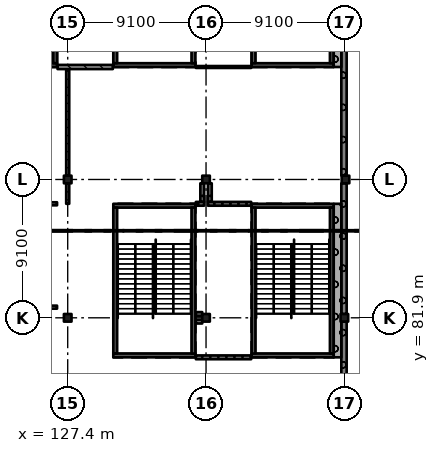
"""IFC4 building model, lengths in metres.
Left out: names, types, materials, properties, quantities, classifications, styles, units other than length and angle.
Written with IfcOpenShell. Run it as: python <this file> out.ifc"""

import sys

from ifc_helpers import new_model, si_unit, direction, frame, frame_2d, origin, origin_2d, place, context, subcontext, project, spatial, rectangle, extrude, element, fill, save


model = new_model("IFC4")
c1 = context("Model", 3, precision=1e-05, world=origin(), true_north=direction((0.0, 1.0)))
c2 = subcontext(c1, "Body", "Model", "MODEL_VIEW")
j1 = project(units=[si_unit("LENGTHUNIT", "METRE"), si_unit("PLANEANGLEUNIT", "RADIAN")], contexts=[c1])
p1 = place(None, origin())
s1 = spatial("IfcSite", under=j1, at=p1, CompositionType="ELEMENT")
p2 = place(p1, origin())
s2 = spatial("IfcBuilding", under=s1, at=p2, CompositionType="ELEMENT")
p3 = place(p2, frame((0.0, 0.0, 24.57)))
s3 = spatial("IfcBuildingStorey", under=s2, at=p3, CompositionType="ELEMENT", Elevation=24.57)
for number, where, z_axis, x_axis in (
    (1, (127.4, 81.9, 0.0), (0.0, 0.0, 1.0), (1.0, 0.0, 0.0)),
    (2, (127.4, 91.0, 0.0), (0.0, 0.0, 1.0), (1.0, 0.0, 0.0)),
    (3, (136.5, 81.9, 0.0), (0.0, 0.0, 1.0), (1.0, 0.0, 0.0)),
    (4, (136.5, 91.0, 0.0), (0.0, 0.0, 1.0), (1.0, 0.0, 0.0)),
    (5, (145.6, 81.9, 0.0), (0.0, 0.0, 1.0), (1.0, 0.0, 0.0)),
    (6, (145.675, 91.0, 0.0), (0.0, 0.0, 1.0), (1.0, 0.0, 0.0)),
):
    element("IfcColumn", number, at=place(p3, frame(where, z_axis=z_axis, x_axis=x_axis)), inside=s3, PredefinedType="COLUMN", context=c2, shape_type="SweptSolid", body=[
        extrude(rectangle(XDim=0.5, YDim=0.5, at=origin_2d()), origin(), (0.0, 0.0, 1.0), 4.55),
    ])
p4 = place(p3, frame((144.9, 98.525, 0.0), z_axis=(0.0, 0.0, 1.0), x_axis=(-1.0, 0.0, 0.0)))
e7 = element("IfcWall", 7, at=p4, inside=s3, PredefinedType="SHEAR", context=c2, shape_type="SweptSolid", body=[
    extrude(rectangle(XDim=5.4, YDim=0.25, at=frame_2d((2.7, 0.0))), origin(), (0.0, 0.0, 1.0), 4.55),
])
p5 = place(p4, frame((1.5, 0.0, 0.0)))
e8 = element("IfcOpeningElement", 8, at=p5, cuts=e7, PredefinedType="OPENING", context=c2, shape_type="SweptSolid", body=[
    extrude(rectangle(XDim=2.4, YDim=2.1, at=frame_2d((1.2, 1.05))), frame((0.0, 0.135, 0.0), z_axis=(0.0, -1.0, 0.0), x_axis=(1.0, 0.0, 0.0)), (0.0, 0.0, 1.0), 0.27),
])
for number, where, z_axis, x_axis in (
    (9, (139.625, 108.25, 0.0), (0.0, 0.0, 1.0), (0.0, -1.0, 0.0)),
    (10, (144.775, 108.25, 0.0), (0.0, 0.0, 1.0), (0.0, -1.0, 0.0)),
):
    element("IfcWall", number, at=place(p3, frame(where, z_axis=z_axis, x_axis=x_axis)), inside=s3, PredefinedType="SHEAR", context=c2, shape_type="SweptSolid", body=[
        extrude(rectangle(XDim=9.6, YDim=0.25, at=frame_2d((4.8, 0.0))), origin(), (0.0, 0.0, 1.0), 4.55),
    ])
p6 = place(p3, frame((135.8, 98.525, 0.0), z_axis=(0.0, 0.0, 1.0), x_axis=(-1.0, 0.0, 0.0)))
e11 = element("IfcWall", 11, at=p6, inside=s3, PredefinedType="SHEAR", context=c2, shape_type="SweptSolid", body=[
    extrude(rectangle(XDim=5.4, YDim=0.25, at=frame_2d((2.7, 0.0))), origin(), (0.0, 0.0, 1.0), 4.55),
])
p7 = place(p6, frame((1.5, 0.0, 0.0)))
e12 = element("IfcOpeningElement", 12, at=p7, cuts=e11, PredefinedType="OPENING", context=c2, shape_type="SweptSolid", body=[
    extrude(rectangle(XDim=2.4, YDim=2.1, at=frame_2d((1.2, 1.05))), frame((0.0, 0.135, 0.0), z_axis=(0.0, -1.0, 0.0), x_axis=(1.0, 0.0, 0.0)), (0.0, 0.0, 1.0), 0.27),
])
for number, where, z_axis, x_axis in (
    (13, (130.525, 108.25, 0.0), (0.0, 0.0, 1.0), (0.0, -1.0, 0.0)),
    (14, (135.675, 108.25, 0.0), (0.0, 0.0, 1.0), (0.0, -1.0, 0.0)),
):
    element("IfcWall", number, at=place(p3, frame(where, z_axis=z_axis, x_axis=x_axis)), inside=s3, PredefinedType="SHEAR", context=c2, shape_type="SweptSolid", body=[
        extrude(rectangle(XDim=9.6, YDim=0.25, at=frame_2d((4.8, 0.0))), origin(), (0.0, 0.0, 1.0), 4.55),
    ])
p8 = place(p3, frame((126.7, 98.525, 0.0), z_axis=(0.0, 0.0, 1.0), x_axis=(-1.0, 0.0, 0.0)))
e15 = element("IfcWall", 15, at=p8, inside=s3, PredefinedType="SHEAR", context=c2, shape_type="SweptSolid", body=[
    extrude(rectangle(XDim=5.4, YDim=0.25, at=frame_2d((2.7, 0.0))), origin(), (0.0, 0.0, 1.0), 4.55),
])
p9 = place(p8, frame((1.5, 0.0, 0.0)))
e16 = element("IfcOpeningElement", 16, at=p9, cuts=e15, PredefinedType="OPENING", context=c2, shape_type="SweptSolid", body=[
    extrude(rectangle(XDim=2.4, YDim=2.1, at=frame_2d((1.2, 1.05))), frame((0.0, 0.135, 0.0), z_axis=(0.0, -1.0, 0.0), x_axis=(1.0, 0.0, 0.0)), (0.0, 0.0, 1.0), 0.27),
])
p10 = place(p3, frame((126.575, 108.25, 0.0), z_axis=(0.0, 0.0, 1.0), x_axis=(0.0, -1.0, 0.0)))
e17 = element("IfcWall", 17, at=p10, inside=s3, PredefinedType="SHEAR", context=c2, shape_type="SweptSolid", body=[
    extrude(rectangle(XDim=9.6, YDim=0.25, at=frame_2d((4.8, 0.0))), origin(), (0.0, 0.0, 1.0), 4.55),
])
p11 = place(p3, frame((144.9, 79.425, 0.0), z_axis=(0.0, 0.0, 1.0), x_axis=(-1.0, 0.0, 0.0)))
e18 = element("IfcWall", 18, at=p11, inside=s3, PredefinedType="SHEAR", context=c2, shape_type="SweptSolid", body=[
    extrude(rectangle(XDim=5.4, YDim=0.25, at=frame_2d((2.7, 0.0))), origin(), (0.0, 0.0, 1.0), 4.55),
])
p12 = place(p3, frame((144.9, 89.275, 0.0), z_axis=(0.0, 0.0, 1.0), x_axis=(-1.0, 0.0, 0.0)))
e19 = element("IfcWall", 19, at=p12, inside=s3, PredefinedType="SHEAR", context=c2, shape_type="SweptSolid", body=[
    extrude(rectangle(XDim=5.4, YDim=0.25, at=frame_2d((2.7, 0.0))), origin(), (0.0, 0.0, 1.0), 4.55),
])
p13 = place(p12, frame((1.5, 0.0, 0.0)))
e20 = element("IfcOpeningElement", 20, at=p13, cuts=e19, PredefinedType="OPENING", context=c2, shape_type="SweptSolid", body=[
    extrude(rectangle(XDim=2.4, YDim=2.1, at=frame_2d((1.2, 1.05))), frame((0.0, 0.135, 0.0), z_axis=(0.0, -1.0, 0.0), x_axis=(1.0, 0.0, 0.0)), (0.0, 0.0, 1.0), 0.27),
])
for number, where, z_axis, x_axis in (
    (21, (139.625, 89.15, 0.0), (0.0, 0.0, 1.0), (0.0, -1.0, 0.0)),
    (22, (144.775, 89.15, 0.0), (0.0, 0.0, 1.0), (0.0, -1.0, 0.0)),
):
    element("IfcWall", number, at=place(p3, frame(where, z_axis=z_axis, x_axis=x_axis)), inside=s3, PredefinedType="SHEAR", context=c2, shape_type="SweptSolid", body=[
        extrude(rectangle(XDim=9.6, YDim=0.25, at=frame_2d((4.8, 0.0))), origin(), (0.0, 0.0, 1.0), 4.55),
    ])
p14 = place(p3, frame((135.8, 79.425, 0.0), z_axis=(0.0, 0.0, 1.0), x_axis=(-1.0, 0.0, 0.0)))
e23 = element("IfcWall", 23, at=p14, inside=s3, PredefinedType="SHEAR", context=c2, shape_type="SweptSolid", body=[
    extrude(rectangle(XDim=5.4, YDim=0.25, at=frame_2d((2.7, 0.0))), origin(), (0.0, 0.0, 1.0), 4.55),
])
p15 = place(p3, frame((135.8, 89.275, 0.0), z_axis=(0.0, 0.0, 1.0), x_axis=(-1.0, 0.0, 0.0)))
e24 = element("IfcWall", 24, at=p15, inside=s3, PredefinedType="SHEAR", context=c2, shape_type="SweptSolid", body=[
    extrude(rectangle(XDim=5.4, YDim=0.25, at=frame_2d((2.7, 0.0))), origin(), (0.0, 0.0, 1.0), 4.55),
])
p16 = place(p15, frame((1.5, 0.0, 0.0)))
e25 = element("IfcOpeningElement", 25, at=p16, cuts=e24, PredefinedType="OPENING", context=c2, shape_type="SweptSolid", body=[
    extrude(rectangle(XDim=2.4, YDim=2.1, at=frame_2d((1.2, 1.05))), frame((0.0, 0.135, 0.0), z_axis=(0.0, -1.0, 0.0), x_axis=(1.0, 0.0, 0.0)), (0.0, 0.0, 1.0), 0.27),
])
for number, where, z_axis, x_axis in (
    (26, (130.525, 89.15, 0.0), (0.0, 0.0, 1.0), (0.0, -1.0, 0.0)),
    (27, (135.675, 89.15, 0.0), (0.0, 0.0, 1.0), (0.0, -1.0, 0.0)),
):
    element("IfcWall", number, at=place(p3, frame(where, z_axis=z_axis, x_axis=x_axis)), inside=s3, PredefinedType="SHEAR", context=c2, shape_type="SweptSolid", body=[
        extrude(rectangle(XDim=9.6, YDim=0.25, at=frame_2d((4.8, 0.0))), origin(), (0.0, 0.0, 1.0), 4.55),
    ])
p17 = place(p3, frame((145.575, 73.05, 0.0), z_axis=(0.0, 0.0, 1.0), x_axis=(0.0, 1.0, 0.0)))
e28 = element("IfcWall", 28, at=p17, inside=s3, PredefinedType="SOLIDWALL", context=c2, shape_type="SweptSolid", body=[
    extrude(rectangle(XDim=8.6, YDim=0.35, at=frame_2d((4.3, 0.0))), origin(), (0.0, 0.0, 1.0), 3.6),
])
for number, where, z_axis, x_axis in (
    (29, (145.575, 82.15, 0.0), (0.0, 0.0, 1.0), (0.0, 1.0, 0.0)),
    (30, (145.575, 91.25, 0.0), (0.0, 0.0, 1.0), (0.0, 1.0, 0.0)),
):
    element("IfcWall", number, at=place(p3, frame(where, z_axis=z_axis, x_axis=x_axis)), inside=s3, PredefinedType="SOLIDWALL", context=c2, shape_type="SweptSolid", body=[
        extrude(rectangle(XDim=8.6, YDim=0.35, at=frame_2d((4.3, 0.0))), origin(), (0.0, 0.0, 1.0), 3.6),
    ])
p18 = place(p3, frame((145.15, 98.4, 0.0), z_axis=(0.0, 0.0, 1.0), x_axis=(0.0, 1.0, 0.0)))
e31 = element("IfcWall", 31, at=p18, inside=s3, PredefinedType="SOLIDWALL", context=c2, shape_type="SweptSolid", body=[
    extrude(rectangle(XDim=10.1, YDim=0.5, at=frame_2d((5.05, 0.0))), origin(), (0.0, 0.0, 1.0), 4.55),
])
p19 = place(p3, frame((145.15, 79.3, 0.0), z_axis=(0.0, 0.0, 1.0), x_axis=(0.0, 1.0, 0.0)))
e32 = element("IfcWall", 32, at=p19, inside=s3, PredefinedType="SOLIDWALL", context=c2, shape_type="SweptSolid", body=[
    extrude(rectangle(XDim=10.1, YDim=0.5, at=frame_2d((5.05, 0.0))), origin(), (0.0, 0.0, 1.0), 4.55),
])
p20 = place(p3, frame((126.7, 82.6, 0.0), z_axis=(0.0, 0.0, 1.0), x_axis=(-1.0, 0.0, 0.0)))
e33 = element("IfcWall", 33, at=p20, inside=s3, PredefinedType="PARTITIONING", context=c2, shape_type="SweptSolid", body=[
    extrude(rectangle(XDim=0.57, YDim=0.2, at=frame_2d((0.285, 0.0))), origin(), (0.0, 0.0, 1.0), 4.35),
])
p21 = place(p3, frame((126.7, 89.4, 0.0), z_axis=(0.0, 0.0, 1.0), x_axis=(-1.0, 0.0, 0.0)))
e34 = element("IfcWall", 34, at=p21, inside=s3, PredefinedType="PARTITIONING", context=c2, shape_type="SweptSolid", body=[
    extrude(rectangle(XDim=5.4, YDim=0.2, at=frame_2d((2.7, 0.0))), origin(), (0.0, 0.0, 1.0), 4.35),
])
p22 = place(p21, frame((1.85, 0.0, 0.0)))
e35 = element("IfcOpeningElement", 35, at=p22, cuts=e34, PredefinedType="OPENING", context=c2, shape_type="SweptSolid", body=[
    extrude(rectangle(XDim=1.8, YDim=2.4, at=frame_2d((0.9, 1.2))), frame((0.0, 0.11, 0.0), z_axis=(0.0, -1.0, 0.0), x_axis=(1.0, 0.0, 0.0)), (0.0, 0.0, 1.0), 0.22),
])
p23 = place(p3, frame((126.73, 98.4, 0.0), z_axis=(0.0, 0.0, 1.0), x_axis=(1.0, 0.0, 0.0)))
e36 = element("IfcWall", 36, at=p23, inside=s3, PredefinedType="SOLIDWALL", context=c2, shape_type="SweptSolid", body=[
    extrude(rectangle(XDim=3.64, YDim=0.275, at=frame_2d((1.82, 0.0))), origin(), (0.0, 0.0, 1.0), 4.35),
])
p24 = place(p23, frame((1.52, 0.0, 0.0)))
e37 = element("IfcOpeningElement", 37, at=p24, cuts=e36, PredefinedType="OPENING", context=c2, shape_type="SweptSolid", body=[
    extrude(rectangle(XDim=1.2, YDim=2.4, at=frame_2d((0.6, 1.2))), frame((0.0, 0.147, 0.0), z_axis=(0.0, -1.0, 0.0), x_axis=(1.0, 0.0, 0.0)), (0.0, 0.0, 1.0), 0.295),
])
p25 = place(p3, frame((127.4, 89.4, 0.0), z_axis=(0.0, 0.0, 1.0), x_axis=(0.0, 1.0, 0.0)))
e38 = element("IfcWall", 38, at=p25, inside=s3, PredefinedType="PARTITIONING", context=c2, shape_type="SweptSolid", body=[
    extrude(rectangle(XDim=1.35, YDim=0.2, at=frame_2d((0.675, 0.0))), origin(), (0.0, 0.0, 1.0), 3.6),
])
p26 = place(p3, frame((127.4, 91.25, 0.0), z_axis=(0.0, 0.0, 1.0), x_axis=(0.0, 1.0, 0.0)))
e39 = element("IfcWall", 39, at=p26, inside=s3, PredefinedType="PARTITIONING", context=c2, shape_type="SweptSolid", body=[
    extrude(rectangle(XDim=7.012, YDim=0.2, at=frame_2d((3.506, 0.0))), origin(), (0.0, 0.0, 1.0), 3.6),
])
p27 = place(p26, frame((0.85, 0.0, 0.0)))
e40 = element("IfcOpeningElement", 40, at=p27, cuts=e39, PredefinedType="OPENING", context=c2, shape_type="SweptSolid", body=[
    extrude(rectangle(XDim=1.8, YDim=2.4, at=frame_2d((0.9, 1.2))), frame((0.0, 0.11, 0.0), z_axis=(0.0, -1.0, 0.0), x_axis=(1.0, 0.0, 0.0)), (0.0, 0.0, 1.0), 0.22),
])
p28 = place(p26, frame((4.35, 0.0, 0.0)))
e41 = element("IfcOpeningElement", 41, at=p28, cuts=e39, PredefinedType="OPENING", context=c2, shape_type="SweptSolid", body=[
    extrude(rectangle(XDim=1.8, YDim=2.4, at=frame_2d((0.9, 1.2))), frame((0.0, 0.11, 0.0), z_axis=(0.0, -1.0, 0.0), x_axis=(1.0, 0.0, 0.0)), (0.0, 0.0, 1.0), 0.22),
])
p29 = place(p3, frame((135.83, 81.65, 0.0), z_axis=(0.0, 0.0, 1.0), x_axis=(1.0, 0.0, 0.0)))
e42 = element("IfcWall", 42, at=p29, inside=s3, PredefinedType="SOLIDWALL", context=c2, shape_type="SweptSolid", body=[
    extrude(rectangle(XDim=0.42, YDim=0.25, at=frame_2d((0.21, 0.0))), origin(), (0.0, 0.0, 1.0), 4.35),
])
p30 = place(p3, frame((135.83, 98.4, 0.0), z_axis=(0.0, 0.0, 1.0), x_axis=(1.0, 0.0, 0.0)))
e43 = element("IfcWall", 43, at=p30, inside=s3, PredefinedType="PARTITIONING", context=c2, shape_type="SweptSolid", body=[
    extrude(rectangle(XDim=3.64, YDim=0.125, at=frame_2d((1.82, 0.0))), origin(), (0.0, 0.0, 1.0), 4.35),
])
p31 = place(p30, frame((1.35, 0.0, 0.0)))
e44 = element("IfcOpeningElement", 44, at=p31, cuts=e43, PredefinedType="OPENING", context=c2, shape_type="SweptSolid", body=[
    extrude(rectangle(XDim=0.9, YDim=2.1, at=frame_2d((0.45, 1.05))), frame((0.0, 0.073, 0.0), z_axis=(0.0, -1.0, 0.0), x_axis=(1.0, 0.0, 0.0)), (0.0, 0.0, 1.0), 0.145),
])
p32 = place(p3, frame((136.25, 82.15, 0.0), z_axis=(0.0, 0.0, 1.0), x_axis=(-1.0, 0.0, 0.0)))
e45 = element("IfcWall", 45, at=p32, inside=s3, PredefinedType="SOLIDWALL", context=c2, shape_type="SweptSolid", body=[
    extrude(rectangle(XDim=0.42, YDim=0.25, at=frame_2d((0.21, 0.0))), origin(), (0.0, 0.0, 1.0), 4.35),
])
p33 = place(p3, frame((136.25, 90.75, 0.0), z_axis=(0.0, 0.0, 1.0), x_axis=(0.0, -1.0, 0.0)))
e46 = element("IfcWall", 46, at=p33, inside=s3, PredefinedType="SOLIDWALL", context=c2, shape_type="SweptSolid", body=[
    extrude(rectangle(XDim=1.225, YDim=0.25, at=frame_2d((0.613, 0.0))), origin(), (0.0, 0.0, 1.0), 4.35),
])
p34 = place(p3, frame((136.375, 89.4, 0.0), z_axis=(0.0, 0.0, 1.0), x_axis=(-1.0, 0.0, 0.0)))
e47 = element("IfcWall", 47, at=p34, inside=s3, PredefinedType="SOLIDWALL", context=c2, shape_type="SweptSolid", body=[
    extrude(rectangle(XDim=0.545, YDim=0.25, at=frame_2d((0.272, 0.0))), origin(), (0.0, 0.0, 1.0), 4.35),
])
p35 = place(p3, frame((136.75, 89.525, 0.0), z_axis=(0.0, 0.0, 1.0), x_axis=(0.0, 1.0, 0.0)))
e48 = element("IfcWall", 48, at=p35, inside=s3, PredefinedType="SOLIDWALL", context=c2, shape_type="SweptSolid", body=[
    extrude(rectangle(XDim=1.225, YDim=0.25, at=frame_2d((0.613, 0.0))), origin(), (0.0, 0.0, 1.0), 4.35),
])
p36 = place(p3, frame((139.47, 79.3, 0.0), z_axis=(0.0, 0.0, 1.0), x_axis=(-1.0, 0.0, 0.0)))
e49 = element("IfcWall", 49, at=p36, inside=s3, PredefinedType="SOLIDWALL", context=c2, shape_type="SweptSolid", body=[
    extrude(rectangle(XDim=3.64, YDim=0.25, at=frame_2d((1.82, 0.0))), origin(), (0.0, 0.0, 1.0), 4.35),
])
p37 = place(p3, frame((139.47, 89.4, 0.0), z_axis=(0.0, 0.0, 1.0), x_axis=(-1.0, 0.0, 0.0)))
e50 = element("IfcWall", 50, at=p37, inside=s3, PredefinedType="SOLIDWALL", context=c2, shape_type="SweptSolid", body=[
    extrude(rectangle(XDim=2.845, YDim=0.25, at=frame_2d((1.422, 0.0))), origin(), (0.0, 0.0, 1.0), 4.35),
])
p38 = place(p37, frame((1.05, 0.0, 0.0)))
e51 = element("IfcOpeningElement", 51, at=p38, cuts=e50, PredefinedType="OPENING", context=c2, shape_type="SweptSolid", body=[
    extrude(rectangle(XDim=0.8, YDim=2.1, at=frame_2d((0.4, 1.05))), frame((0.0, 0.135, 0.0), z_axis=(0.0, -1.0, 0.0), x_axis=(1.0, 0.0, 0.0)), (0.0, 0.0, 1.0), 0.27),
])
p39 = place(p38, origin())
e52 = element("IfcDoor", 52, at=p39, inside=s3, OperationType="SINGLE_SWING_LEFT", PredefinedType="DOOR", context=c2, shape_type="SweptSolid", body=[
    extrude(rectangle(XDim=0.8, YDim=2.1, at=frame_2d((0.4, 1.05))), frame((0.0, 0.025, 0.0), z_axis=(0.0, -1.0, 0.0), x_axis=(1.0, 0.0, 0.0)), (0.0, 0.0, 1.0), 0.05),
])
fill(e51, e52)
p40 = place(p31, origin())
e53 = element("IfcDoor", 53, at=p40, inside=s3, OperationType="SINGLE_SWING_RIGHT", PredefinedType="DOOR", context=c2, shape_type="SweptSolid", body=[
    extrude(rectangle(XDim=0.9, YDim=2.1, at=frame_2d((0.45, 1.05))), frame((0.0, 0.025, 0.0), z_axis=(0.0, -1.0, 0.0), x_axis=(1.0, 0.0, 0.0)), (0.0, 0.0, 1.0), 0.05),
])
fill(e44, e53)
p41 = place(p24, origin())
e54 = element("IfcDoor", 54, at=p41, inside=s3, OperationType="SINGLE_SWING_RIGHT", PredefinedType="DOOR", context=c2, shape_type="SweptSolid", body=[
    extrude(rectangle(XDim=1.2, YDim=2.4, at=frame_2d((0.6, 1.2))), frame((0.0, 0.025, 0.0), z_axis=(0.0, -1.0, 0.0), x_axis=(1.0, 0.0, 0.0)), (0.0, 0.0, 1.0), 0.05),
])
fill(e37, e54)
p42 = place(p27, origin())
e55 = element("IfcDoor", 55, at=p42, inside=s3, OperationType="DOUBLE_DOOR_SINGLE_SWING", PredefinedType="DOOR", context=c2, shape_type="SweptSolid", body=[
    extrude(rectangle(XDim=1.8, YDim=2.4, at=frame_2d((0.9, 1.2))), frame((0.0, 0.025, 0.0), z_axis=(0.0, -1.0, 0.0), x_axis=(1.0, 0.0, 0.0)), (0.0, 0.0, 1.0), 0.05),
])
fill(e40, e55)
p43 = place(p28, origin())
e56 = element("IfcDoor", 56, at=p43, inside=s3, OperationType="DOUBLE_DOOR_SINGLE_SWING", PredefinedType="DOOR", context=c2, shape_type="SweptSolid", body=[
    extrude(rectangle(XDim=1.8, YDim=2.4, at=frame_2d((0.9, 1.2))), frame((0.0, 0.025, 0.0), z_axis=(0.0, -1.0, 0.0), x_axis=(1.0, 0.0, 0.0)), (0.0, 0.0, 1.0), 0.05),
])
fill(e41, e56)
p44 = place(p5, origin())
e57 = element("IfcDoor", 57, at=p44, inside=s3, OperationType="DOUBLE_DOOR_SINGLE_SWING", PredefinedType="DOOR", context=c2, shape_type="SweptSolid", body=[
    extrude(rectangle(XDim=2.4, YDim=2.1, at=frame_2d((1.2, 1.05))), frame((0.0, 0.025, 0.0), z_axis=(0.0, -1.0, 0.0), x_axis=(1.0, 0.0, 0.0)), (0.0, 0.0, 1.0), 0.05),
])
fill(e8, e57)
p45 = place(p7, origin())
e58 = element("IfcDoor", 58, at=p45, inside=s3, OperationType="DOUBLE_DOOR_SINGLE_SWING", PredefinedType="DOOR", context=c2, shape_type="SweptSolid", body=[
    extrude(rectangle(XDim=2.4, YDim=2.1, at=frame_2d((1.2, 1.05))), frame((0.0, 0.025, 0.0), z_axis=(0.0, -1.0, 0.0), x_axis=(1.0, 0.0, 0.0)), (0.0, 0.0, 1.0), 0.05),
])
fill(e12, e58)
p46 = place(p13, origin())
e59 = element("IfcDoor", 59, at=p46, inside=s3, OperationType="DOUBLE_DOOR_SINGLE_SWING", PredefinedType="DOOR", context=c2, shape_type="SweptSolid", body=[
    extrude(rectangle(XDim=2.4, YDim=2.1, at=frame_2d((1.2, 1.05))), frame((0.0, 0.025, 0.0), z_axis=(0.0, -1.0, 0.0), x_axis=(1.0, 0.0, 0.0)), (0.0, 0.0, 1.0), 0.05),
])
fill(e20, e59)
p47 = place(p16, origin())
e60 = element("IfcDoor", 60, at=p47, inside=s3, OperationType="DOUBLE_DOOR_SINGLE_SWING", PredefinedType="DOOR", context=c2, shape_type="SweptSolid", body=[
    extrude(rectangle(XDim=2.4, YDim=2.1, at=frame_2d((1.2, 1.05))), frame((0.0, 0.025, 0.0), z_axis=(0.0, -1.0, 0.0), x_axis=(1.0, 0.0, 0.0)), (0.0, 0.0, 1.0), 0.05),
])
fill(e25, e60)
save(model, sys.argv[1])
